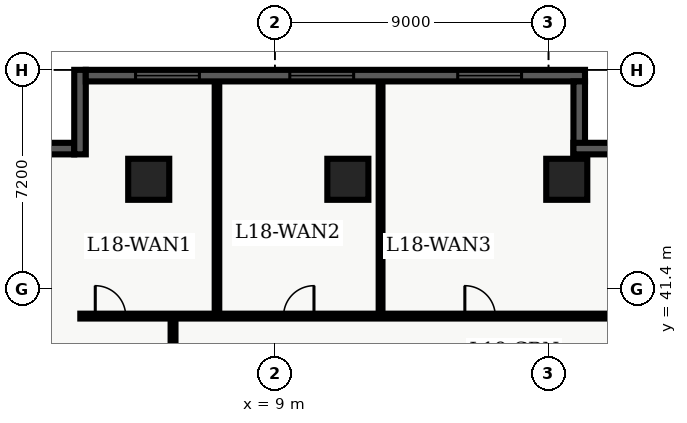
"""IFC4 building model, lengths in metres.
Left out: names, types, materials, properties, quantities, classifications, styles, units other than length and angle.
Written with IfcOpenShell. Run it as: python <this file> out.ifc"""

import sys

from ifc_helpers import new_model, entity, si_unit, converted_unit, direction, frame, origin_with_axes, origin_2d_with_axis, place, context, subcontext, project, spatial, polyline, rectangle, outline, extrude, element, fill, save


model = new_model("IFC4")
c1 = context("Model", 3, precision=1e-05, world=origin_with_axes(), true_north=direction((0.0, 1.0)))
c2 = subcontext(c1, "Body", "Model", "MODEL_VIEW")
j1 = project(units=[si_unit("LENGTHUNIT", "METRE"), converted_unit("PLANEANGLEUNIT", "DEGREE", entity("IfcPlaneAngleMeasure", 0.017), si_unit("PLANEANGLEUNIT", "RADIAN"), dimensions=[0, 0, 0, 0, 0, 0, 0])], contexts=[c1])
p1 = place(None, origin_with_axes())
s1 = spatial("IfcSite", under=j1, at=p1, CompositionType="ELEMENT")
p2 = place(p1, origin_with_axes())
s2 = spatial("IfcBuilding", under=s1, at=p2, CompositionType="ELEMENT")
p3 = place(p2, frame((0.0, 0.0, 75.6), z_axis=(0.0, 0.0, 1.0), x_axis=(1.0, 0.0, 0.0)))
s3 = spatial("IfcBuildingStorey", under=s2, at=p3, CompositionType="ELEMENT", Elevation=75.6)
for number, where, z_axis, x_axis in (
    (1, (11.4, 45.0, 0.0), (0.0, 0.0, 1.0), (1.0, 0.0, 0.0)),
    (2, (18.6, 45.0, 0.0), (0.0, 0.0, 1.0), (1.0, 0.0, 0.0)),
    (3, (4.85, 45.0, 0.0), (0.0, 0.0, 1.0), (1.0, 0.0, 0.0)),
):
    element("IfcColumn", number, at=place(p3, frame(where, z_axis=z_axis, x_axis=x_axis)), inside=s3, PredefinedType="COLUMN", context=c2, shape_type="SweptSolid", body=[
        extrude(rectangle(XDim=1.35, YDim=1.35, at=origin_2d_with_axis()), origin_with_axes(), (0.0, 0.0, 1.0), 3.9),
    ])
p4 = place(p3, frame((2.6, 40.5, 0.0), z_axis=(0.0, 0.0, 1.0), x_axis=(1.0, 0.0, 0.0)))
e4 = element("IfcWall", 4, at=p4, inside=s3, PredefinedType="PARTITIONING", context=c2, shape_type="SweptSolid", body=[
    extrude(outline(polyline([(0.0, -0.08), (18.65, -0.08), (18.65, 0.08), (0.0, 0.08), (0.0, -0.08)])), origin_with_axes(), (0.0, 0.0, 1.0), 2.64),
])
p5 = place(p4, frame((0.992, 0.0, 0.0), z_axis=(0.0, 0.0, 1.0), x_axis=(1.0, 0.0, 0.0)))
e5 = element("IfcOpeningElement", 5, at=p5, cuts=e4, PredefinedType="OPENING", context=c2, shape_type="SweptSolid", body=[
    extrude(rectangle(XDim=1.0, YDim=0.18, at=origin_2d_with_axis()), origin_with_axes(), (0.0, 0.0, 1.0), 2.15),
])
p6 = place(p4, frame((7.186, 0.0, 0.0), z_axis=(0.0, 0.0, 1.0), x_axis=(1.0, 0.0, 0.0)))
e6 = element("IfcOpeningElement", 6, at=p6, cuts=e4, PredefinedType="OPENING", context=c2, shape_type="SweptSolid", body=[
    extrude(rectangle(XDim=1.0, YDim=0.18, at=origin_2d_with_axis()), origin_with_axes(), (0.0, 0.0, 1.0), 2.15),
])
p7 = place(p4, frame((13.148, 0.0, 0.0), z_axis=(0.0, 0.0, 1.0), x_axis=(1.0, 0.0, 0.0)))
e7 = element("IfcOpeningElement", 7, at=p7, cuts=e4, PredefinedType="OPENING", context=c2, shape_type="SweptSolid", body=[
    extrude(rectangle(XDim=1.0, YDim=0.18, at=origin_2d_with_axis()), origin_with_axes(), (0.0, 0.0, 1.0), 2.15),
])
p8 = place(p3, frame((5.65, 7.8, 0.0), z_axis=(0.0, 0.0, 1.0), x_axis=(0.0, 1.0, 0.0)))
e8 = element("IfcWall", 8, at=p8, inside=s3, PredefinedType="PARTITIONING", context=c2, shape_type="SweptSolid", body=[
    extrude(outline(polyline([(0.0, -0.08), (32.7, -0.08), (32.7, 0.08), (0.0, 0.08), (0.0, -0.08)])), origin_with_axes(), (0.0, 0.0, 1.0), 2.64),
])
p9 = place(p8, frame((4.537, 0.0, 0.0), z_axis=(0.0, 0.0, 1.0), x_axis=(1.0, 0.0, 0.0)))
e9 = element("IfcOpeningElement", 9, at=p9, cuts=e8, PredefinedType="OPENING", context=c2, shape_type="SweptSolid", body=[
    extrude(rectangle(XDim=1.0, YDim=0.18, at=origin_2d_with_axis()), origin_with_axes(), (0.0, 0.0, 1.0), 2.15),
])
p10 = place(p8, frame((13.551, 0.0, 0.0), z_axis=(0.0, 0.0, 1.0), x_axis=(1.0, 0.0, 0.0)))
e10 = element("IfcOpeningElement", 10, at=p10, cuts=e8, PredefinedType="OPENING", context=c2, shape_type="SweptSolid", body=[
    extrude(rectangle(XDim=1.0, YDim=0.18, at=origin_2d_with_axis()), origin_with_axes(), (0.0, 0.0, 1.0), 2.15),
])
p11 = place(p8, frame((25.643, 0.0, 0.0), z_axis=(0.0, 0.0, 1.0), x_axis=(1.0, 0.0, 0.0)))
e11 = element("IfcOpeningElement", 11, at=p11, cuts=e8, PredefinedType="OPENING", context=c2, shape_type="SweptSolid", body=[
    extrude(rectangle(XDim=1.0, YDim=0.18, at=origin_2d_with_axis()), origin_with_axes(), (0.0, 0.0, 1.0), 2.15),
])
p12 = place(p3, frame((7.095, 40.6, 0.0), z_axis=(0.0, 0.0, 1.0), x_axis=(0.0, 1.0, 0.0)))
e12 = element("IfcWall", 12, at=p12, inside=s3, PredefinedType="PARTITIONING", context=c2, shape_type="SweptSolid", body=[
    extrude(outline(polyline([(0.0, -0.075), (7.64, -0.075), (7.64, 0.075), (0.0, 0.075), (0.0, -0.075)])), origin_with_axes(), (0.0, 0.0, 1.0), 2.64),
])
p13 = place(p3, frame((12.476, 40.6, 0.0), z_axis=(0.0, 0.0, 1.0), x_axis=(0.0, 1.0, 0.0)))
e13 = element("IfcWall", 13, at=p13, inside=s3, PredefinedType="PARTITIONING", context=c2, shape_type="SweptSolid", body=[
    extrude(outline(polyline([(0.0, -0.062), (7.64, -0.062), (7.64, 0.062), (0.0, 0.062), (0.0, -0.062)])), origin_with_axes(), (0.0, 0.0, 1.0), 2.64),
])
p14 = place(p3, frame((0.38, 46.01, 0.0), z_axis=(0.0, 0.0, 1.0), x_axis=(1.0, 0.0, 0.0)))
e14 = element("IfcWall", 14, at=p14, inside=s3, PredefinedType="SOLIDWALL", context=c2, shape_type="SweptSolid", body=[
    extrude(outline(polyline([(0.0, -0.19), (2.02, -0.19), (2.02, 0.19), (0.0, 0.19), (0.0, -0.19)])), origin_with_axes(), (0.0, 0.0, 1.0), 3.6),
])
p15 = place(p3, frame((2.59, 45.82, 0.0), z_axis=(0.0, 0.0, 1.0), x_axis=(0.0, 1.0, 0.0)))
e15 = element("IfcWall", 15, at=p15, inside=s3, PredefinedType="SOLIDWALL", context=c2, shape_type="SweptSolid", body=[
    extrude(outline(polyline([(0.0, -0.19), (2.78, -0.19), (2.78, 0.19), (0.0, 0.19), (0.0, -0.19)])), origin_with_axes(), (0.0, 0.0, 1.0), 3.6),
])
p16 = place(p3, frame((2.78, 48.41, 0.0), z_axis=(0.0, 0.0, 1.0), x_axis=(1.0, 0.0, 0.0)))
e16 = element("IfcWall", 16, at=p16, inside=s3, PredefinedType="SOLIDWALL", context=c2, shape_type="SweptSolid", body=[
    extrude(outline(polyline([(0.0, -0.19), (16.42, -0.19), (16.42, 0.19), (0.0, 0.19), (0.0, -0.19)])), origin_with_axes(), (0.0, 0.0, 1.0), 3.6),
])
p17 = place(p16, frame((2.687, 0.0, 0.45), z_axis=(0.0, 0.0, 1.0), x_axis=(1.0, 0.0, 0.0)))
e17 = element("IfcOpeningElement", 17, at=p17, cuts=e16, PredefinedType="OPENING", context=c2, shape_type="SweptSolid", body=[
    extrude(rectangle(XDim=2.1, YDim=0.4, at=origin_2d_with_axis()), origin_with_axes(), (0.0, 0.0, 1.0), 2.2),
])
p18 = place(p16, frame((7.76, 0.0, 0.45), z_axis=(0.0, 0.0, 1.0), x_axis=(1.0, 0.0, 0.0)))
e18 = element("IfcOpeningElement", 18, at=p18, cuts=e16, PredefinedType="OPENING", context=c2, shape_type="SweptSolid", body=[
    extrude(rectangle(XDim=2.1, YDim=0.4, at=origin_2d_with_axis()), origin_with_axes(), (0.0, 0.0, 1.0), 2.2),
])
p19 = place(p16, frame((13.283, 0.0, 0.45), z_axis=(0.0, 0.0, 1.0), x_axis=(1.0, 0.0, 0.0)))
e19 = element("IfcOpeningElement", 19, at=p19, cuts=e16, PredefinedType="OPENING", context=c2, shape_type="SweptSolid", body=[
    extrude(rectangle(XDim=2.1, YDim=0.4, at=origin_2d_with_axis()), origin_with_axes(), (0.0, 0.0, 1.0), 2.2),
])
p20 = place(p3, frame((19.01, 48.22, 0.0), z_axis=(0.0, 0.0, 1.0), x_axis=(0.0, -1.0, 0.0)))
e20 = element("IfcWall", 20, at=p20, inside=s3, PredefinedType="SOLIDWALL", context=c2, shape_type="SweptSolid", body=[
    extrude(outline(polyline([(0.0, -0.19), (2.56, -0.19), (2.56, 0.19), (0.0, 0.19), (0.0, -0.19)])), origin_with_axes(), (0.0, 0.0, 1.0), 3.6),
])
p21 = place(p3, frame((18.82, 46.01, 0.0), z_axis=(0.0, 0.0, 1.0), x_axis=(1.0, 0.0, 0.0)))
e21 = element("IfcWall", 21, at=p21, inside=s3, PredefinedType="SOLIDWALL", context=c2, shape_type="SweptSolid", body=[
    extrude(outline(polyline([(0.0, -0.19), (2.78, -0.19), (2.78, 0.19), (0.0, 0.19), (0.0, -0.19)])), origin_with_axes(), (0.0, 0.0, 1.0), 3.6),
])
p22 = place(p4, frame((0.992, 0.0, 0.0), z_axis=(0.0, 0.0, 1.0), x_axis=(1.0, 0.0, 0.0)))
e22 = element("IfcDoor", 22, at=p22, inside=s3, OperationType="SINGLE_SWING_LEFT", PredefinedType="DOOR", context=c2, shape_type="SweptSolid", body=[
    extrude(rectangle(XDim=1.0, YDim=0.09, at=origin_2d_with_axis()), origin_with_axes(), (0.0, 0.0, 1.0), 2.15),
])
fill(e5, e22)
p23 = place(p4, frame((7.186, 0.0, 0.0), z_axis=(0.0, 0.0, 1.0), x_axis=(1.0, 0.0, 0.0)))
e23 = element("IfcDoor", 23, at=p23, inside=s3, OperationType="SINGLE_SWING_RIGHT", PredefinedType="DOOR", context=c2, shape_type="SweptSolid", body=[
    extrude(rectangle(XDim=1.0, YDim=0.09, at=origin_2d_with_axis()), origin_with_axes(), (0.0, 0.0, 1.0), 2.15),
])
fill(e6, e23)
p24 = place(p4, frame((13.148, 0.0, 0.0), z_axis=(0.0, 0.0, 1.0), x_axis=(1.0, 0.0, 0.0)))
e24 = element("IfcDoor", 24, at=p24, inside=s3, OperationType="SINGLE_SWING_LEFT", PredefinedType="DOOR", context=c2, shape_type="SweptSolid", body=[
    extrude(rectangle(XDim=1.0, YDim=0.09, at=origin_2d_with_axis()), origin_with_axes(), (0.0, 0.0, 1.0), 2.15),
])
fill(e7, e24)
p25 = place(p16, frame((2.687, 0.0, 0.45), z_axis=(0.0, 0.0, 1.0), x_axis=(1.0, 0.0, 0.0)))
e25 = element("IfcWindow", 25, at=p25, inside=s3, PredefinedType="WINDOW", context=c2, shape_type="SweptSolid", body=[
    extrude(rectangle(XDim=2.1, YDim=0.09, at=origin_2d_with_axis()), origin_with_axes(), (0.0, 0.0, 1.0), 2.2),
])
fill(e17, e25)
p26 = place(p16, frame((7.76, 0.0, 0.45), z_axis=(0.0, 0.0, 1.0), x_axis=(1.0, 0.0, 0.0)))
e26 = element("IfcWindow", 26, at=p26, inside=s3, PredefinedType="WINDOW", context=c2, shape_type="SweptSolid", body=[
    extrude(rectangle(XDim=2.1, YDim=0.09, at=origin_2d_with_axis()), origin_with_axes(), (0.0, 0.0, 1.0), 2.2),
])
fill(e18, e26)
p27 = place(p16, frame((13.283, 0.0, 0.45), z_axis=(0.0, 0.0, 1.0), x_axis=(1.0, 0.0, 0.0)))
e27 = element("IfcWindow", 27, at=p27, inside=s3, PredefinedType="WINDOW", context=c2, shape_type="SweptSolid", body=[
    extrude(rectangle(XDim=2.1, YDim=0.09, at=origin_2d_with_axis()), origin_with_axes(), (0.0, 0.0, 1.0), 2.2),
])
fill(e19, e27)
save(model, sys.argv[1])
